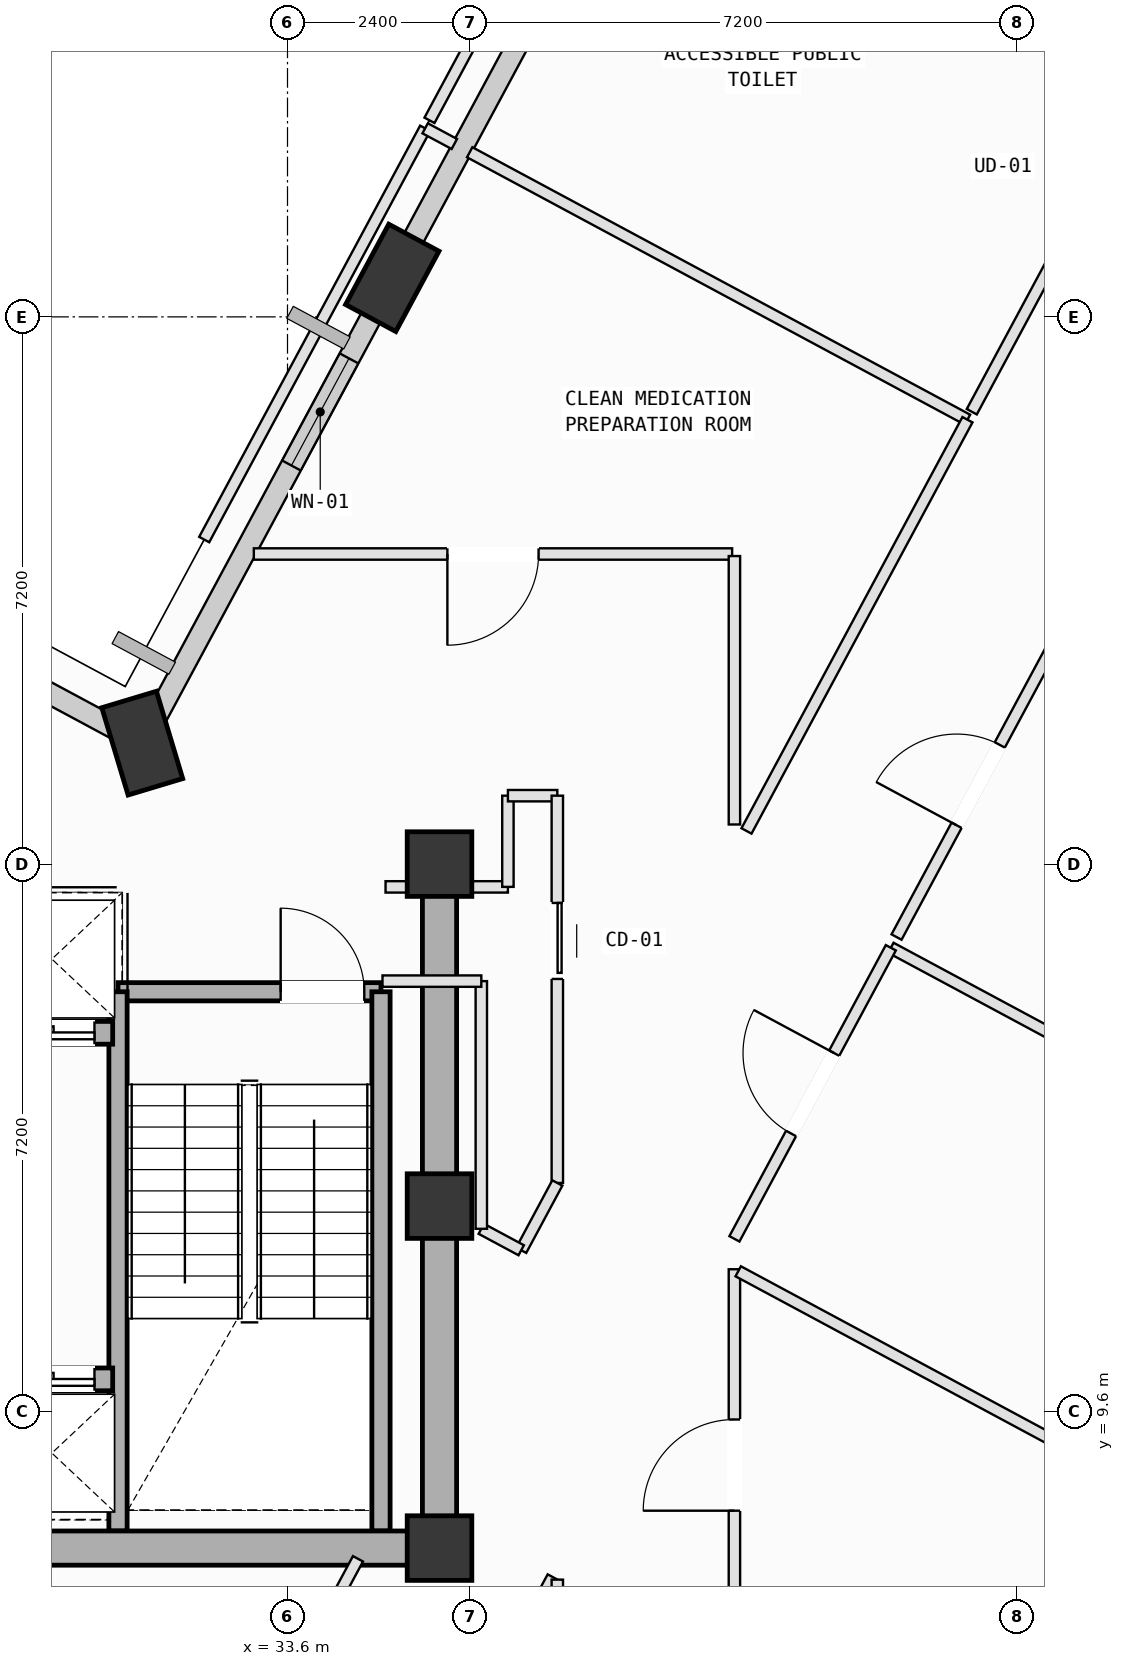
"""IFC4 building model, lengths in metres.
Left out: names, types, materials, properties, quantities, classifications, styles, units other than length and angle.
Written with IfcOpenShell. Run it as: python <this file> out.ifc"""

import sys

from ifc_helpers import new_model, si_unit, direction, frame, frame_2d, origin, origin_2d, place, context, subcontext, project, spatial, rectangle, extrude, element, fill, save


model = new_model("IFC4")
c1 = context("Model", 3, precision=1e-05, world=origin(), true_north=direction((0.0, 1.0)))
c2 = subcontext(c1, "Body", "Model", "MODEL_VIEW")
j1 = project(units=[si_unit("LENGTHUNIT", "METRE"), si_unit("PLANEANGLEUNIT", "RADIAN")], contexts=[c1])
p1 = place(None, origin())
s1 = spatial("IfcSite", under=j1, at=p1, CompositionType="ELEMENT")
p2 = place(p1, origin())
s2 = spatial("IfcBuilding", under=s1, at=p2, CompositionType="ELEMENT")
p3 = place(p2, frame((0.0, 0.0, 288.6)))
s3 = spatial("IfcBuildingStorey", under=s2, at=p3, CompositionType="ELEMENT", Elevation=288.6)
for number, where, z_axis, x_axis in (
    (1, (35.6, 7.8, 0.0), (0.0, 0.0, 1.0), (1.0, 0.0, 0.0)),
    (2, (35.6, 12.3, 0.0), (0.0, 0.0, 1.0), (1.0, 0.0, 0.0)),
    (3, (35.6, 16.8, 0.0), (0.0, 0.0, 1.0), (1.0, 0.0, 0.0)),
):
    element("IfcColumn", number, at=place(p3, frame(where, z_axis=z_axis, x_axis=x_axis)), inside=s3, PredefinedType="COLUMN", context=c2, shape_type="SweptSolid", body=[
        extrude(rectangle(XDim=0.85, YDim=0.85, at=origin_2d()), origin(), (0.0, 0.0, 1.0), 4.0),
    ])
p4 = place(p3, frame((34.979, 24.513, 0.002), z_axis=(0.001160710729, 0.005742463608, 0.999982838284), x_axis=(-0.638457278881, -0.769639960871, 0.005160782248)))
e4 = element("IfcColumn", 4, at=p4, inside=s3, PredefinedType="COLUMN", context=c2, shape_type="SweptSolid", body=[
    extrude(rectangle(XDim=1.2, YDim=0.75, at=origin_2d()), origin(), (0.0, 0.0, 1.0), 3.996),
])
p5 = place(p3, frame((31.689, 18.391, 0.002), z_axis=(0.026625482146, -0.00769452007, 0.999615865251), x_axis=(-0.999585944385, -0.011118265183, 0.026539102593)))
e5 = element("IfcColumn", 5, at=p5, inside=s3, PredefinedType="COLUMN", context=c2, shape_type="SweptSolid", body=[
    extrude(rectangle(XDim=1.2, YDim=0.75, at=origin_2d()), origin(), (0.0, 0.0, 1.0), 3.998),
])
p6 = place(p3, frame((35.172, 24.873, 0.0), z_axis=(0.0, 0.0, 1.0), x_axis=(0.473318247503, 0.880891501026, 0.0)))
e6 = element("IfcWall", 6, at=p6, inside=s3, PredefinedType="SOLIDWALL", context=c2, shape_type="SweptSolid", body=[
    extrude(rectangle(XDim=6.409, YDim=0.28, at=frame_2d((3.205, 0.0))), origin(), (0.0, 0.0, 1.0), 3.265),
])
p7 = place(p6, frame((3.533, 0.0, 0.75)))
e7 = element("IfcOpeningElement", 7, at=p7, cuts=e6, PredefinedType="OPENING", context=c2, shape_type="SweptSolid", body=[
    extrude(rectangle(XDim=1.2, YDim=1.75, at=frame_2d((0.6, 0.875))), frame((0.0, 0.15, 0.0), z_axis=(0.0, -1.0, 0.0), x_axis=(1.0, 0.0, 0.0)), (0.0, 0.0, 1.0), 0.3),
])
p8 = place(p3, frame((31.881, 18.748, 0.0), z_axis=(0.0, 0.0, 1.0), x_axis=(0.473312386533, 0.880894650202, 0.0)))
e8 = element("IfcWall", 8, at=p8, inside=s3, PredefinedType="SOLIDWALL", context=c2, shape_type="SweptSolid", body=[
    extrude(rectangle(XDim=6.158, YDim=0.28, at=frame_2d((3.079, 0.0))), origin(), (0.0, 0.0, 1.0), 3.265),
])
p9 = place(p8, frame((3.742, 0.0, 0.75)))
e9 = element("IfcOpeningElement", 9, at=p9, cuts=e8, PredefinedType="OPENING", context=c2, shape_type="SweptSolid", body=[
    extrude(rectangle(XDim=1.6, YDim=1.95, at=frame_2d((0.8, 0.975))), frame((0.0, 0.15, 0.0), z_axis=(0.0, -1.0, 0.0), x_axis=(1.0, 0.0, 0.0)), (0.0, 0.0, 1.0), 0.3),
])
p10 = place(p3, frame((25.257, 21.847, 0.0), z_axis=(0.0, 0.0, 1.0), x_axis=(0.880904495482, -0.473294062756, 0.0)))
e10 = element("IfcWall", 10, at=p10, inside=s3, PredefinedType="SOLIDWALL", context=c2, shape_type="SweptSolid", body=[
    extrude(rectangle(XDim=6.958, YDim=0.28, at=frame_2d((3.479, 0.0))), origin(), (0.0, 0.0, 1.0), 3.165),
])
p11 = place(p3, frame((31.37, 15.12, 0.0), z_axis=(0.0, 0.0, 1.0), x_axis=(1.0, 0.0, 0.0)))
e11 = element("IfcWall", 11, at=p11, inside=s3, PredefinedType="SOLIDWALL", context=c2, shape_type="SweptSolid", body=[
    extrude(rectangle(XDim=3.46, YDim=0.24, at=frame_2d((1.73, 0.0))), origin(), (0.0, 0.0, 1.0), 3.78),
])
p12 = place(p11, frame((2.14, 0.0, 0.0)))
e12 = element("IfcOpeningElement", 12, at=p12, cuts=e11, PredefinedType="OPENING", context=c2, shape_type="SweptSolid", body=[
    extrude(rectangle(XDim=1.1, YDim=2.15, at=frame_2d((0.55, 1.075))), frame((0.0, 0.13, 0.0), z_axis=(0.0, -1.0, 0.0), x_axis=(1.0, 0.0, 0.0)), (0.0, 0.0, 1.0), 0.26),
])
for number, where, z_axis, x_axis in (
    (13, (34.83, 15.12, 0.0), (0.0, 0.0, 1.0), (0.0, -1.0, 0.0)),
    (14, (31.37, 8.025, 0.0), (0.0, 0.0, 1.0), (0.0, 1.0, 0.0)),
):
    element("IfcWall", number, at=place(p3, frame(where, z_axis=z_axis, x_axis=x_axis)), inside=s3, PredefinedType="SOLIDWALL", context=c2, shape_type="SweptSolid", body=[
        extrude(rectangle(XDim=7.095, YDim=0.24, at=frame_2d((3.548, 0.0))), origin(), (0.0, 0.0, 1.0), 3.78),
    ])
p13 = place(p3, frame((24.8, 7.8, 0.0), z_axis=(0.0, 0.0, 1.0), x_axis=(1.0, 0.0, 0.0)))
e15 = element("IfcWall", 15, at=p13, inside=s3, PredefinedType="SHEAR", context=c2, shape_type="SweptSolid", body=[
    extrude(rectangle(XDim=10.8, YDim=0.45, at=frame_2d((5.4, 0.0))), origin(), (0.0, 0.0, 1.0), 3.78),
])
p14 = place(p3, frame((35.6, 7.8, 0.0), z_axis=(0.0, 0.0, 1.0), x_axis=(0.0, 1.0, 0.0)))
e16 = element("IfcWall", 16, at=p14, inside=s3, PredefinedType="SHEAR", context=c2, shape_type="SweptSolid", body=[
    extrude(rectangle(XDim=9.0, YDim=0.45, at=frame_2d((4.5, 0.0))), origin(), (0.0, 0.0, 1.0), 3.78),
])
p15 = place(p3, frame((29.6, 10.02, 0.0), z_axis=(0.0, 0.0, 1.0), x_axis=(1.0, 0.0, 0.0)))
e17 = element("IfcWall", 17, at=p15, inside=s3, PredefinedType="SOLIDWALL", context=c2, shape_type="SweptSolid", body=[
    extrude(rectangle(XDim=1.7, YDim=0.3, at=frame_2d((0.85, 0.0))), origin(), (0.0, 0.0, 1.0), 3.78),
])
p16 = place(p15, frame((0.34, 0.0, 0.0)))
e18 = element("IfcOpeningElement", 18, at=p16, cuts=e17, PredefinedType="OPENING", context=c2, shape_type="SweptSolid", body=[
    extrude(rectangle(XDim=1.12, YDim=2.15, at=frame_2d((0.56, 1.075))), frame((0.0, 0.16, 0.0), z_axis=(0.0, -1.0, 0.0), x_axis=(1.0, 0.0, 0.0)), (0.0, 0.0, 1.0), 0.32),
])
p17 = place(p3, frame((29.6, 14.58, 0.0), z_axis=(0.0, 0.0, 1.0), x_axis=(1.0, 0.0, 0.0)))
e19 = element("IfcWall", 19, at=p17, inside=s3, PredefinedType="SOLIDWALL", context=c2, shape_type="SweptSolid", body=[
    extrude(rectangle(XDim=1.7, YDim=0.3, at=frame_2d((0.85, 0.0))), origin(), (0.0, 0.0, 1.0), 3.78),
])
p18 = place(p17, frame((0.34, 0.0, 0.0)))
e20 = element("IfcOpeningElement", 20, at=p18, cuts=e19, PredefinedType="OPENING", context=c2, shape_type="SweptSolid", body=[
    extrude(rectangle(XDim=1.12, YDim=2.15, at=frame_2d((0.56, 1.075))), frame((0.0, 0.16, 0.0), z_axis=(0.0, -1.0, 0.0), x_axis=(1.0, 0.0, 0.0)), (0.0, 0.0, 1.0), 0.32),
])
p19 = place(p3, frame((34.94, 3.419, 0.0), z_axis=(0.0, 0.0, 1.0), x_axis=(0.473301278414, 0.880900618601, 0.0)))
e21 = element("IfcWall", 21, at=p19, inside=s3, PredefinedType="PARTITIONING", context=c2, shape_type="SweptSolid", body=[
    extrude(rectangle(XDim=4.541, YDim=0.15, at=frame_2d((2.271, 0.0))), origin(), (0.0, 0.0, 1.0), 3.78),
])
p20 = place(p3, frame((37.15, 7.385, 0.0), z_axis=(0.0, 0.0, 1.0), x_axis=(0.0, -1.0, 0.0)))
e22 = element("IfcWall", 22, at=p20, inside=s3, PredefinedType="PARTITIONING", context=c2, shape_type="SweptSolid", body=[
    extrude(rectangle(XDim=2.188, YDim=0.15, at=frame_2d((1.094, 0.0))), origin(), (0.0, 0.0, 1.0), 3.78),
])
p21 = place(p3, frame((39.48, 6.315, 0.0), z_axis=(0.0, 0.0, 1.0), x_axis=(0.0, 1.0, 0.0)))
e23 = element("IfcWall", 23, at=p21, inside=s3, PredefinedType="PARTITIONING", context=c2, shape_type="SweptSolid", body=[
    extrude(rectangle(XDim=5.154, YDim=0.15, at=frame_2d((2.577, 0.0))), origin(), (0.0, 0.0, 1.0), 3.78),
])
p22 = place(p21, frame((1.977, 0.0, 0.0)))
e24 = element("IfcOpeningElement", 24, at=p22, cuts=e23, PredefinedType="OPENING", context=c2, shape_type="SweptSolid", body=[
    extrude(rectangle(XDim=1.2, YDim=2.15, at=frame_2d((0.6, 1.075))), frame((0.0, 0.085, 0.0), z_axis=(0.0, -1.0, 0.0), x_axis=(1.0, 0.0, 0.0)), (0.0, 0.0, 1.0), 0.17),
])
p23 = place(p3, frame((39.53, 11.442, 0.0), z_axis=(0.0, 0.0, 1.0), x_axis=(0.880873551666, -0.473351651497, 0.0)))
e25 = element("IfcWall", 25, at=p23, inside=s3, PredefinedType="PARTITIONING", context=c2, shape_type="SweptSolid", body=[
    extrude(rectangle(XDim=10.588, YDim=0.15, at=frame_2d((5.294, 0.0))), origin(), (0.0, 0.0, 1.0), 3.78),
])
p24 = place(p3, frame((41.538, 15.699, 0.0), z_axis=(0.0, 0.0, 1.0), x_axis=(0.880861511404, -0.47337405688, 0.0)))
e26 = element("IfcWall", 26, at=p24, inside=s3, PredefinedType="PARTITIONING", context=c2, shape_type="SweptSolid", body=[
    extrude(rectangle(XDim=10.835, YDim=0.15, at=frame_2d((5.417, 0.0))), origin(), (0.0, 0.0, 1.0), 3.78),
])
p25 = place(p3, frame((39.48, 11.869, 0.0), z_axis=(0.0, 0.0, 1.0), x_axis=(0.473342913311, 0.880878247216, 0.0)))
e27 = element("IfcWall", 27, at=p25, inside=s3, PredefinedType="PARTITIONING", context=c2, shape_type="SweptSolid", body=[
    extrude(rectangle(XDim=4.348, YDim=0.15, at=frame_2d((2.174, 0.0))), origin(), (0.0, 0.0, 1.0), 3.78),
])
p26 = place(p25, frame((1.574, 0.0, 0.0)))
e28 = element("IfcOpeningElement", 28, at=p26, cuts=e27, PredefinedType="OPENING", context=c2, shape_type="SweptSolid", body=[
    extrude(rectangle(XDim=1.2, YDim=2.15, at=frame_2d((0.6, 1.075))), frame((0.0, 0.085, 0.0), z_axis=(0.0, -1.0, 0.0), x_axis=(1.0, 0.0, 0.0)), (0.0, 0.0, 1.0), 0.17),
])
p27 = place(p3, frame((41.613, 15.84, 0.0), z_axis=(0.0, 0.0, 1.0), x_axis=(0.47334923321, 0.880874851168, 0.0)))
e29 = element("IfcWall", 29, at=p27, inside=s3, PredefinedType="PARTITIONING", context=c2, shape_type="SweptSolid", body=[
    extrude(rectangle(XDim=4.54, YDim=0.15, at=frame_2d((2.27, 0.0))), origin(), (0.0, 0.0, 1.0), 3.78),
])
p28 = place(p27, frame((1.67, 0.0, 0.0)))
e30 = element("IfcOpeningElement", 30, at=p28, cuts=e29, PredefinedType="OPENING", context=c2, shape_type="SweptSolid", body=[
    extrude(rectangle(XDim=1.2, YDim=2.15, at=frame_2d((0.6, 1.075))), frame((0.0, 0.085, 0.0), z_axis=(0.0, -1.0, 0.0), x_axis=(1.0, 0.0, 0.0)), (0.0, 0.0, 1.0), 0.17),
])
p29 = place(p3, frame((34.89, 16.5, 0.0), z_axis=(0.0, 0.0, 1.0), x_axis=(1.0, 0.0, 0.0)))
e31 = element("IfcWall", 31, at=p29, inside=s3, PredefinedType="PARTITIONING", context=c2, shape_type="SweptSolid", body=[
    extrude(rectangle(XDim=1.61, YDim=0.15, at=frame_2d((0.805, 0.0))), origin(), (0.0, 0.0, 1.0), 3.165),
])
p30 = place(p3, frame((36.5, 16.5, 0.0), z_axis=(0.0, 0.0, 1.0), x_axis=(0.0, 1.0, 0.0)))
e32 = element("IfcWall", 32, at=p30, inside=s3, PredefinedType="PARTITIONING", context=c2, shape_type="SweptSolid", body=[
    extrude(rectangle(XDim=1.2, YDim=0.15, at=frame_2d((0.6, 0.0))), origin(), (0.0, 0.0, 1.0), 3.78),
])
p31 = place(p3, frame((36.5, 17.7, 0.0), z_axis=(0.0, 0.0, 1.0), x_axis=(1.0, 0.0, 0.0)))
e33 = element("IfcWall", 33, at=p31, inside=s3, PredefinedType="PARTITIONING", context=c2, shape_type="SweptSolid", body=[
    extrude(rectangle(XDim=0.65, YDim=0.15, at=frame_2d((0.325, 0.0))), origin(), (0.0, 0.0, 1.0), 3.78),
])
p32 = place(p3, frame((37.15, 17.7, 0.0), z_axis=(0.0, 0.0, 1.0), x_axis=(0.0, -1.0, 0.0)))
e34 = element("IfcWall", 34, at=p32, inside=s3, PredefinedType="PARTITIONING", context=c2, shape_type="SweptSolid", body=[
    extrude(rectangle(XDim=5.096, YDim=0.15, at=frame_2d((2.548, 0.0))), origin(), (0.0, 0.0, 1.0), 3.78),
])
p33 = place(p32, frame((1.412, 0.0, 0.0)))
e35 = element("IfcOpeningElement", 35, at=p33, cuts=e34, PredefinedType="OPENING", context=c2, shape_type="SweptSolid", body=[
    extrude(rectangle(XDim=1.0, YDim=2.12, at=frame_2d((0.5, 1.06))), frame((0.0, 0.085, 0.0), z_axis=(0.0, -1.0, 0.0), x_axis=(1.0, 0.0, 0.0)), (0.0, 0.0, 1.0), 0.17),
])
p34 = place(p3, frame((37.15, 12.604, 0.0), z_axis=(0.0, 0.0, 1.0), x_axis=(-0.472794687641, -0.881172618355, 0.0)))
e36 = element("IfcWall", 36, at=p34, inside=s3, PredefinedType="PARTITIONING", context=c2, shape_type="SweptSolid", body=[
    extrude(rectangle(XDim=1.004, YDim=0.15, at=frame_2d((0.502, 0.0))), origin(), (0.0, 0.0, 1.0), 3.78),
])
p35 = place(p3, frame((36.675, 11.719, 0.0), z_axis=(0.0, 0.0, 1.0), x_axis=(-0.881022881887, 0.473073653454, 0.0)))
e37 = element("IfcWall", 37, at=p35, inside=s3, PredefinedType="PARTITIONING", context=c2, shape_type="SweptSolid", body=[
    extrude(rectangle(XDim=0.596, YDim=0.15, at=frame_2d((0.298, 0.0))), origin(), (0.0, 0.0, 1.0), 3.78),
])
p36 = place(p3, frame((36.15, 12.001, 0.0), z_axis=(0.0, 0.0, 1.0), x_axis=(0.0, 1.0, 0.0)))
e38 = element("IfcWall", 38, at=p36, inside=s3, PredefinedType="PARTITIONING", context=c2, shape_type="SweptSolid", body=[
    extrude(rectangle(XDim=3.259, YDim=0.15, at=frame_2d((1.629, 0.0))), origin(), (0.0, 0.0, 1.0), 3.78),
])
p37 = place(p3, frame((36.15, 15.26, 0.0), z_axis=(0.0, 0.0, 1.0), x_axis=(-1.0, 0.0, 0.0)))
e39 = element("IfcWall", 39, at=p37, inside=s3, PredefinedType="PARTITIONING", context=c2, shape_type="SweptSolid", body=[
    extrude(rectangle(XDim=1.3, YDim=0.15, at=frame_2d((0.65, 0.0))), origin(), (0.0, 0.0, 1.0), 3.78),
])
p38 = place(p3, frame((39.45, 20.88, 0.0), z_axis=(0.0, 0.0, 1.0), x_axis=(-1.0, 0.0, 0.0)))
e40 = element("IfcWall", 40, at=p38, inside=s3, PredefinedType="PARTITIONING", context=c2, shape_type="SweptSolid", body=[
    extrude(rectangle(XDim=6.293, YDim=0.15, at=frame_2d((3.146, 0.0))), origin(), (0.0, 0.0, 1.0), 3.415),
])
p39 = place(p38, frame((2.546, 0.0, 0.0)))
e41 = element("IfcOpeningElement", 41, at=p39, cuts=e40, PredefinedType="OPENING", context=c2, shape_type="SweptSolid", body=[
    extrude(rectangle(XDim=1.2, YDim=2.15, at=frame_2d((0.6, 1.075))), frame((0.0, 0.085, 0.0), z_axis=(0.0, -1.0, 0.0), x_axis=(1.0, 0.0, 0.0)), (0.0, 0.0, 1.0), 0.17),
])
p40 = place(p3, frame((32.504, 21.07, 0.0), z_axis=(0.0, 0.0, 1.0), x_axis=(0.473270026335, 0.880917409394, 0.0)))
e42 = element("IfcWall", 42, at=p40, inside=s3, PredefinedType="PARTITIONING", context=c2, shape_type="SweptSolid", body=[
    extrude(rectangle(XDim=6.142, YDim=0.15, at=frame_2d((3.071, 0.0))), origin(), (0.0, 0.0, 1.0), 3.78),
])
p41 = place(p3, frame((35.411, 26.481, 0.0), z_axis=(0.0, 0.0, 1.0), x_axis=(0.881171652639, -0.472796487493, 0.0)))
e43 = element("IfcWall", 43, at=p41, inside=s3, PredefinedType="PARTITIONING", context=c2, shape_type="SweptSolid", body=[
    extrude(rectangle(XDim=0.436, YDim=0.15, at=frame_2d((0.218, 0.0))), origin(), (0.0, 0.0, 1.0), 3.78),
])
p42 = place(p3, frame((35.997, 26.166, 0.0), z_axis=(0.0, 0.0, 1.0), x_axis=(0.88087780034, -0.473343744934, 0.0)))
e44 = element("IfcWall", 44, at=p42, inside=s3, PredefinedType="PARTITIONING", context=c2, shape_type="SweptSolid", body=[
    extrude(rectangle(XDim=7.434, YDim=0.15, at=frame_2d((3.717, 0.0))), origin(), (0.0, 0.0, 1.0), 3.78),
])
p43 = place(p3, frame((42.546, 22.647, 0.0), z_axis=(0.0, 0.0, 1.0), x_axis=(-0.473270026335, -0.880917409394, 0.0)))
e45 = element("IfcWall", 45, at=p43, inside=s3, PredefinedType="PARTITIONING", context=c2, shape_type="SweptSolid", body=[
    extrude(rectangle(XDim=6.142, YDim=0.15, at=frame_2d((3.071, 0.0))), origin(), (0.0, 0.0, 1.0), 3.78),
])
p44 = place(p3, frame((39.48, 17.321, 0.0), z_axis=(0.0, 0.0, 1.0), x_axis=(0.0, 1.0, 0.0)))
e46 = element("IfcWall", 46, at=p44, inside=s3, PredefinedType="PARTITIONING", context=c2, shape_type="SweptSolid", body=[
    extrude(rectangle(XDim=3.532, YDim=0.15, at=frame_2d((1.766, 0.0))), origin(), (0.0, 0.0, 1.0), 3.78),
])
p45 = place(p3, frame((45.666, 28.453, 0.0), z_axis=(0.0, 0.0, 1.0), x_axis=(-0.473292007071, -0.880905599961, 0.0)))
e47 = element("IfcWall", 47, at=p45, inside=s3, PredefinedType="PARTITIONING", context=c2, shape_type="SweptSolid", body=[
    extrude(rectangle(XDim=6.472, YDim=0.15, at=frame_2d((3.236, 0.0))), origin(), (0.0, 0.0, 1.0), 3.78),
])
p46 = place(p45, frame((2.776, 0.0, 0.0)))
e48 = element("IfcOpeningElement", 48, at=p46, cuts=e47, PredefinedType="OPENING", context=c2, shape_type="SweptSolid", body=[
    extrude(rectangle(XDim=0.92, YDim=2.1, at=frame_2d((0.46, 1.05))), frame((0.0, 0.085, 0.0), z_axis=(0.0, -1.0, 0.0), x_axis=(1.0, 0.0, 0.0)), (0.0, 0.0, 1.0), 0.17),
])
p47 = place(p3, frame((35.468, 26.586, 0.0), z_axis=(0.0, 0.0, 1.0), x_axis=(0.473276279195, 0.880914050036, 0.0)))
e49 = element("IfcWall", 49, at=p47, inside=s3, PredefinedType="PARTITIONING", context=c2, shape_type="SweptSolid", body=[
    extrude(rectangle(XDim=6.472, YDim=0.15, at=frame_2d((3.236, 0.0))), origin(), (0.0, 0.0, 1.0), 3.265),
])
p48 = place(p3, frame((34.527, 7.659, 0.0), z_axis=(0.0, 0.0, 1.0), x_axis=(-0.473325963305, -0.880887355149, 0.0)))
e50 = element("IfcWall", 50, at=p48, inside=s3, PredefinedType="PARTITIONING", context=c2, shape_type="SweptSolid", body=[
    extrude(rectangle(XDim=3.82, YDim=0.15, at=frame_2d((1.91, 0.0))), origin(), (0.0, 0.0, 1.0), 3.78),
])
p49 = place(p9, origin())
e51 = element("IfcWindow", 51, at=p49, inside=s3, PartitioningType="SINGLE_PANEL", PredefinedType="WINDOW", context=c2, shape_type="SweptSolid", body=[
    extrude(rectangle(XDim=1.6, YDim=1.95, at=frame_2d((0.8, 0.975))), frame((0.0, 0.03, 0.0), z_axis=(0.0, -1.0, 0.0), x_axis=(1.0, 0.0, 0.0)), (0.0, 0.0, 1.0), 0.06),
])
fill(e9, e51)
p50 = place(p12, origin())
e52 = element("IfcDoor", 52, at=p50, inside=s3, OperationType="SINGLE_SWING_LEFT", PredefinedType="DOOR", context=c2, shape_type="SweptSolid", body=[
    extrude(rectangle(XDim=1.1, YDim=2.15, at=frame_2d((0.55, 1.075))), frame((0.0, 0.025, 0.0), z_axis=(0.0, -1.0, 0.0), x_axis=(1.0, 0.0, 0.0)), (0.0, 0.0, 1.0), 0.05),
])
fill(e12, e52)
p51 = place(p16, origin())
e53 = element("IfcDoor", 53, at=p51, inside=s3, OperationType="DOUBLE_DOOR_SLIDING", PredefinedType="DOOR", context=c2, shape_type="SweptSolid", body=[
    extrude(rectangle(XDim=1.12, YDim=2.15, at=frame_2d((0.56, 1.075))), frame((0.0, 0.025, 0.0), z_axis=(0.0, -1.0, 0.0), x_axis=(1.0, 0.0, 0.0)), (0.0, 0.0, 1.0), 0.05),
])
fill(e18, e53)
p52 = place(p18, origin())
e54 = element("IfcDoor", 54, at=p52, inside=s3, OperationType="DOUBLE_DOOR_SLIDING", PredefinedType="DOOR", context=c2, shape_type="SweptSolid", body=[
    extrude(rectangle(XDim=1.12, YDim=2.15, at=frame_2d((0.56, 1.075))), frame((0.0, 0.025, 0.0), z_axis=(0.0, -1.0, 0.0), x_axis=(1.0, 0.0, 0.0)), (0.0, 0.0, 1.0), 0.05),
])
fill(e20, e54)
p53 = place(p22, origin())
e55 = element("IfcDoor", 55, at=p53, inside=s3, OperationType="SINGLE_SWING_LEFT", PredefinedType="DOOR", context=c2, shape_type="SweptSolid", body=[
    extrude(rectangle(XDim=1.2, YDim=2.15, at=frame_2d((0.6, 1.075))), frame((0.0, 0.025, 0.0), z_axis=(0.0, -1.0, 0.0), x_axis=(1.0, 0.0, 0.0)), (0.0, 0.0, 1.0), 0.05),
])
fill(e24, e55)
p54 = place(p26, origin())
e56 = element("IfcDoor", 56, at=p54, inside=s3, OperationType="SINGLE_SWING_RIGHT", PredefinedType="DOOR", context=c2, shape_type="SweptSolid", body=[
    extrude(rectangle(XDim=1.2, YDim=2.15, at=frame_2d((0.6, 1.075))), frame((0.0, 0.025, 0.0), z_axis=(0.0, -1.0, 0.0), x_axis=(1.0, 0.0, 0.0)), (0.0, 0.0, 1.0), 0.05),
])
fill(e28, e56)
p55 = place(p28, origin())
e57 = element("IfcDoor", 57, at=p55, inside=s3, OperationType="SINGLE_SWING_LEFT", PredefinedType="DOOR", context=c2, shape_type="SweptSolid", body=[
    extrude(rectangle(XDim=1.2, YDim=2.15, at=frame_2d((0.6, 1.075))), frame((0.0, 0.025, 0.0), z_axis=(0.0, -1.0, 0.0), x_axis=(1.0, 0.0, 0.0)), (0.0, 0.0, 1.0), 0.05),
])
fill(e30, e57)
p56 = place(p33, origin())
e58 = element("IfcDoor", 58, at=p56, inside=s3, OperationType="SLIDING_TO_LEFT", PredefinedType="DOOR", context=c2, shape_type="SweptSolid", body=[
    extrude(rectangle(XDim=1.0, YDim=2.12, at=frame_2d((0.5, 1.06))), frame((0.0, 0.025, 0.0), z_axis=(0.0, -1.0, 0.0), x_axis=(1.0, 0.0, 0.0)), (0.0, 0.0, 1.0), 0.05),
])
fill(e35, e58)
p57 = place(p39, origin())
e59 = element("IfcDoor", 59, at=p57, inside=s3, OperationType="SINGLE_SWING_RIGHT", PredefinedType="DOOR", context=c2, shape_type="SweptSolid", body=[
    extrude(rectangle(XDim=1.2, YDim=2.15, at=frame_2d((0.6, 1.075))), frame((0.0, 0.025, 0.0), z_axis=(0.0, -1.0, 0.0), x_axis=(1.0, 0.0, 0.0)), (0.0, 0.0, 1.0), 0.05),
])
fill(e41, e59)
save(model, sys.argv[1])
